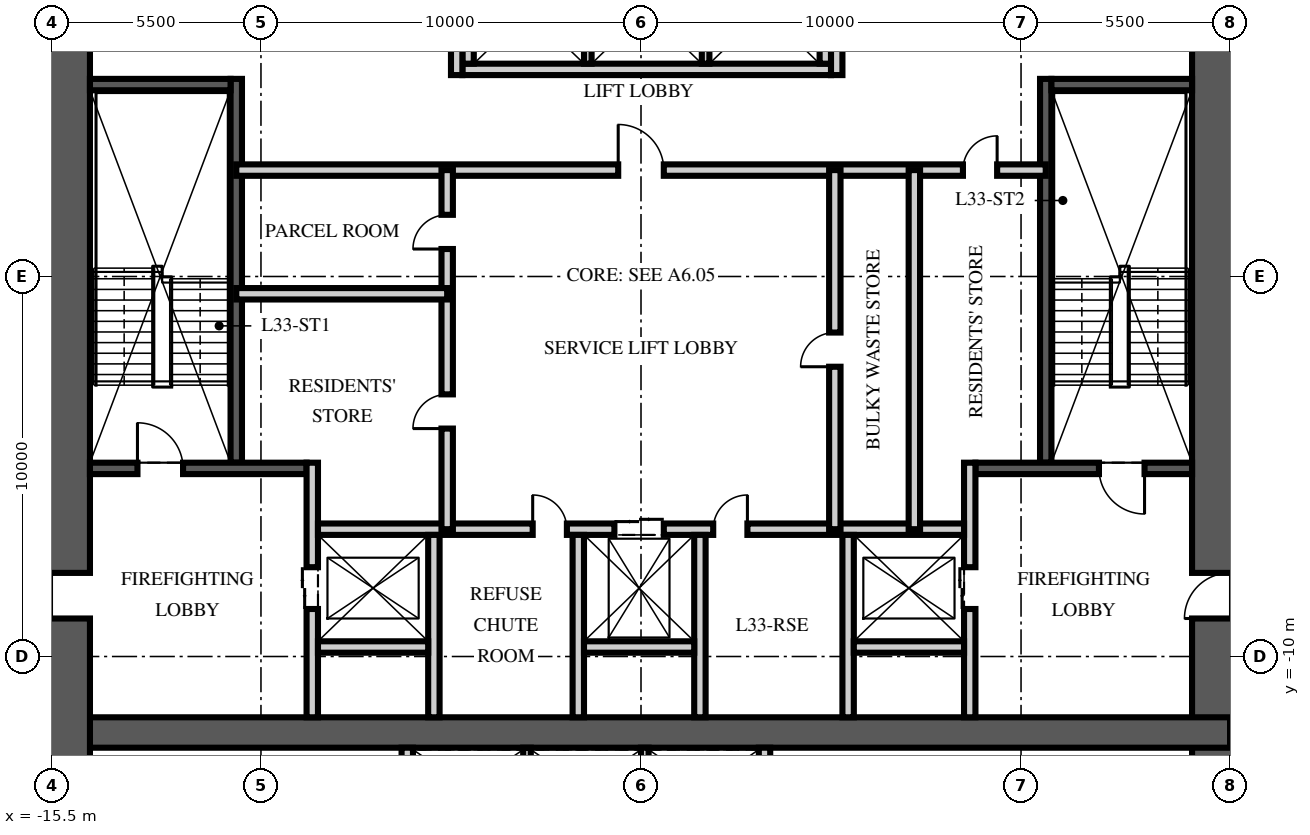
"""IFC4 building model, lengths in metres.
Left out: names, types, materials, properties, quantities, classifications, styles, units other than length and angle.
Written with IfcOpenShell. Run it as: python <this file> out.ifc"""

import sys

from ifc_helpers import new_model, si_unit, direction, frame, frame_2d, origin, place, context, subcontext, project, spatial, rectangle, extrude, element, fill, save


model = new_model("IFC4")
c1 = context("Model", 3, precision=1e-05, world=origin(), true_north=direction((0.0, 1.0)))
c2 = subcontext(c1, "Body", "Model", "MODEL_VIEW")
j1 = project(units=[si_unit("LENGTHUNIT", "METRE"), si_unit("PLANEANGLEUNIT", "RADIAN")], contexts=[c1])
p1 = place(None, origin())
s1 = spatial("IfcSite", under=j1, at=p1, CompositionType="ELEMENT")
p2 = place(p1, origin())
s2 = spatial("IfcBuilding", under=s1, at=p2, CompositionType="ELEMENT")
p3 = place(p2, frame((0.0, 0.0, 133.5)))
s3 = spatial("IfcBuildingStorey", under=s2, at=p3, CompositionType="ELEMENT", Elevation=133.5)
p4 = place(p3, frame((15.5, -15.5, -0.25), z_axis=(0.0, 0.0, 1.0), x_axis=(0.0, 1.0, 0.0)))
e1 = element("IfcWall", 1, at=p4, inside=s3, PredefinedType="SHEAR", context=c2, shape_type="SweptSolid", body=[
    extrude(rectangle(XDim=31.0, YDim=2.0, at=frame_2d((15.5, 0.0))), origin(), (0.0, 0.0, 1.0), 3.75),
])
p5 = place(p4, frame((6.5, 0.0, 0.25)))
e2 = element("IfcOpeningElement", 2, at=p5, cuts=e1, PredefinedType="OPENING", context=c2, shape_type="SweptSolid", body=[
    extrude(rectangle(XDim=1.2, YDim=2.1, at=frame_2d((0.6, 1.05))), frame((0.0, 1.01, 0.0), z_axis=(0.0, -1.0, 0.0), x_axis=(1.0, 0.0, 0.0)), (0.0, 0.0, 1.0), 2.02),
])
p6 = place(p4, frame((23.0, 0.0, 0.25)))
e3 = element("IfcOpeningElement", 3, at=p6, cuts=e1, PredefinedType="OPENING", context=c2, shape_type="SweptSolid", body=[
    extrude(rectangle(XDim=1.8, YDim=2.1, at=frame_2d((0.9, 1.05))), frame((0.0, 1.01, 0.0), z_axis=(0.0, -1.0, 0.0), x_axis=(1.0, 0.0, 0.0)), (0.0, 0.0, 1.0), 2.02),
])
p7 = place(p3, frame((-15.5, -12.0, -0.25), z_axis=(0.0, 0.0, 1.0), x_axis=(1.0, 0.0, 0.0)))
e4 = element("IfcWall", 4, at=p7, inside=s3, PredefinedType="SHEAR", context=c2, shape_type="SweptSolid", body=[
    extrude(rectangle(XDim=31.0, YDim=0.8, at=frame_2d((15.5, 0.0))), origin(), (0.0, 0.0, 1.0), 3.75),
])
p8 = place(p3, frame((-15.5, -15.5, -0.25), z_axis=(0.0, 0.0, 1.0), x_axis=(0.0, 1.0, 0.0)))
e5 = element("IfcWall", 5, at=p8, inside=s3, PredefinedType="SHEAR", context=c2, shape_type="SweptSolid", body=[
    extrude(rectangle(XDim=31.0, YDim=2.0, at=frame_2d((15.5, 0.0))), origin(), (0.0, 0.0, 1.0), 3.75),
])
p9 = place(p8, frame((6.5, 0.0, 0.25)))
e6 = element("IfcOpeningElement", 6, at=p9, cuts=e5, PredefinedType="OPENING", context=c2, shape_type="SweptSolid", body=[
    extrude(rectangle(XDim=1.2, YDim=2.1, at=frame_2d((0.6, 1.05))), frame((0.0, 1.01, 0.0), z_axis=(0.0, -1.0, 0.0), x_axis=(1.0, 0.0, 0.0)), (0.0, 0.0, 1.0), 2.02),
])
p10 = place(p8, frame((23.0, 0.0, 0.25)))
e7 = element("IfcOpeningElement", 7, at=p10, cuts=e5, PredefinedType="OPENING", context=c2, shape_type="SweptSolid", body=[
    extrude(rectangle(XDim=1.8, YDim=2.1, at=frame_2d((0.9, 1.05))), frame((0.0, 1.01, 0.0), z_axis=(0.0, -1.0, 0.0), x_axis=(1.0, 0.0, 0.0)), (0.0, 0.0, 1.0), 2.02),
])
p11 = place(p3, frame((-10.65, -4.9, 0.0), z_axis=(0.0, 0.0, 1.0), x_axis=(0.0, 1.0, 0.0)))
e8 = element("IfcWall", 8, at=p11, inside=s3, PredefinedType="SOLIDWALL", context=c2, shape_type="SweptSolid", body=[
    extrude(rectangle(XDim=10.1, YDim=0.3, at=frame_2d((5.05, 0.0))), origin(), (0.0, 0.0, 1.0), 3.5),
])
p12 = place(p3, frame((-14.5, -5.05, 0.0), z_axis=(0.0, 0.0, 1.0), x_axis=(1.0, 0.0, 0.0)))
e9 = element("IfcWall", 9, at=p12, inside=s3, PredefinedType="SOLIDWALL", context=c2, shape_type="SweptSolid", body=[
    extrude(rectangle(XDim=5.7, YDim=0.3, at=frame_2d((2.85, 0.0))), origin(), (0.0, 0.0, 1.0), 3.5),
])
p13 = place(p12, frame((1.25, 0.0, 0.0)))
e10 = element("IfcOpeningElement", 10, at=p13, cuts=e9, PredefinedType="OPENING", context=c2, shape_type="SweptSolid", body=[
    extrude(rectangle(XDim=1.2, YDim=2.1, at=frame_2d((0.6, 1.05))), frame((0.0, 0.16, 0.0), z_axis=(0.0, -1.0, 0.0), x_axis=(1.0, 0.0, 0.0)), (0.0, 0.0, 1.0), 0.32),
])
p14 = place(p3, frame((-14.5, 5.05, 0.0), z_axis=(0.0, 0.0, 1.0), x_axis=(1.0, 0.0, 0.0)))
e11 = element("IfcWall", 11, at=p14, inside=s3, PredefinedType="SOLIDWALL", context=c2, shape_type="SweptSolid", body=[
    extrude(rectangle(XDim=3.7, YDim=0.3, at=frame_2d((1.85, 0.0))), origin(), (0.0, 0.0, 1.0), 3.5),
])
p15 = place(p3, frame((-8.65, -11.6, 0.0), z_axis=(0.0, 0.0, 1.0), x_axis=(0.0, 1.0, 0.0)))
e12 = element("IfcWall", 12, at=p15, inside=s3, PredefinedType="PARTITIONING", context=c2, shape_type="SweptSolid", body=[
    extrude(rectangle(XDim=6.7, YDim=0.3, at=frame_2d((3.35, 0.0))), origin(), (0.0, 0.0, 1.0), 3.5),
])
p16 = place(p15, frame((2.85, 0.0, 0.0)))
e13 = element("IfcOpeningElement", 13, at=p16, cuts=e12, PredefinedType="OPENING", context=c2, shape_type="SweptSolid", body=[
    extrude(rectangle(XDim=1.1, YDim=2.1, at=frame_2d((0.55, 1.05))), frame((0.0, 0.16, 0.0), z_axis=(0.0, -1.0, 0.0), x_axis=(1.0, 0.0, 0.0)), (0.0, 0.0, 1.0), 0.32),
])
p17 = place(p3, frame((10.65, -4.9, 0.0), z_axis=(0.0, 0.0, 1.0), x_axis=(0.0, 1.0, 0.0)))
e14 = element("IfcWall", 14, at=p17, inside=s3, PredefinedType="SOLIDWALL", context=c2, shape_type="SweptSolid", body=[
    extrude(rectangle(XDim=10.1, YDim=0.3, at=frame_2d((5.05, 0.0))), origin(), (0.0, 0.0, 1.0), 3.5),
])
p18 = place(p3, frame((14.5, -5.05, 0.0), z_axis=(0.0, 0.0, 1.0), x_axis=(-1.0, 0.0, 0.0)))
e15 = element("IfcWall", 15, at=p18, inside=s3, PredefinedType="SOLIDWALL", context=c2, shape_type="SweptSolid", body=[
    extrude(rectangle(XDim=5.7, YDim=0.3, at=frame_2d((2.85, 0.0))), origin(), (0.0, 0.0, 1.0), 3.5),
])
p19 = place(p18, frame((1.25, 0.0, 0.0)))
e16 = element("IfcOpeningElement", 16, at=p19, cuts=e15, PredefinedType="OPENING", context=c2, shape_type="SweptSolid", body=[
    extrude(rectangle(XDim=1.2, YDim=2.1, at=frame_2d((0.6, 1.05))), frame((0.0, 0.16, 0.0), z_axis=(0.0, -1.0, 0.0), x_axis=(1.0, 0.0, 0.0)), (0.0, 0.0, 1.0), 0.32),
])
p20 = place(p3, frame((14.5, 5.05, 0.0), z_axis=(0.0, 0.0, 1.0), x_axis=(-1.0, 0.0, 0.0)))
e17 = element("IfcWall", 17, at=p20, inside=s3, PredefinedType="SOLIDWALL", context=c2, shape_type="SweptSolid", body=[
    extrude(rectangle(XDim=3.7, YDim=0.3, at=frame_2d((1.85, 0.0))), origin(), (0.0, 0.0, 1.0), 3.5),
])
p21 = place(p3, frame((8.65, -11.6, 0.0), z_axis=(0.0, 0.0, 1.0), x_axis=(0.0, 1.0, 0.0)))
e18 = element("IfcWall", 18, at=p21, inside=s3, PredefinedType="PARTITIONING", context=c2, shape_type="SweptSolid", body=[
    extrude(rectangle(XDim=6.7, YDim=0.3, at=frame_2d((3.35, 0.0))), origin(), (0.0, 0.0, 1.0), 3.5),
])
p22 = place(p21, frame((2.85, 0.0, 0.0)))
e19 = element("IfcOpeningElement", 19, at=p22, cuts=e18, PredefinedType="OPENING", context=c2, shape_type="SweptSolid", body=[
    extrude(rectangle(XDim=1.1, YDim=2.1, at=frame_2d((0.55, 1.05))), frame((0.0, 0.16, 0.0), z_axis=(0.0, -1.0, 0.0), x_axis=(1.0, 0.0, 0.0)), (0.0, 0.0, 1.0), 0.32),
])
p23 = place(p3, frame((-8.5, -6.65, 0.0), z_axis=(0.0, 0.0, 1.0), x_axis=(1.0, 0.0, 0.0)))
e20 = element("IfcWall", 20, at=p23, inside=s3, PredefinedType="PARTITIONING", context=c2, shape_type="SweptSolid", body=[
    extrude(rectangle(XDim=17.0, YDim=0.3, at=frame_2d((8.5, 0.0))), origin(), (0.0, 0.0, 1.0), 3.5),
])
p24 = place(p23, frame((7.8, 0.0, 0.0)))
e21 = element("IfcOpeningElement", 21, at=p24, cuts=e20, PredefinedType="OPENING", context=c2, shape_type="SweptSolid", body=[
    extrude(rectangle(XDim=1.3, YDim=2.4, at=frame_2d((0.65, 1.2))), frame((0.0, 0.16, 0.0), z_axis=(0.0, -1.0, 0.0), x_axis=(1.0, 0.0, 0.0)), (0.0, 0.0, 1.0), 0.32),
])
p25 = place(p23, frame((5.65, 0.0, 0.0)))
e22 = element("IfcOpeningElement", 22, at=p25, cuts=e20, PredefinedType="OPENING", context=c2, shape_type="SweptSolid", body=[
    extrude(rectangle(XDim=0.9, YDim=2.1, at=frame_2d((0.45, 1.05))), frame((0.0, 0.16, 0.0), z_axis=(0.0, -1.0, 0.0), x_axis=(1.0, 0.0, 0.0)), (0.0, 0.0, 1.0), 0.32),
])
p26 = place(p23, frame((10.4, 0.0, 0.0)))
e23 = element("IfcOpeningElement", 23, at=p26, cuts=e20, PredefinedType="OPENING", context=c2, shape_type="SweptSolid", body=[
    extrude(rectangle(XDim=0.9, YDim=2.1, at=frame_2d((0.45, 1.05))), frame((0.0, 0.16, 0.0), z_axis=(0.0, -1.0, 0.0), x_axis=(1.0, 0.0, 0.0)), (0.0, 0.0, 1.0), 0.32),
])
for number, where, z_axis, x_axis in (
    (24, (-5.45, -11.6, 0.0), (0.0, 0.0, 1.0), (0.0, 1.0, 0.0)),
    (25, (-1.65, -11.6, 0.0), (0.0, 0.0, 1.0), (0.0, 1.0, 0.0)),
    (26, (1.55, -11.6, 0.0), (0.0, 0.0, 1.0), (0.0, 1.0, 0.0)),
    (27, (5.45, -11.6, 0.0), (0.0, 0.0, 1.0), (0.0, 1.0, 0.0)),
):
    element("IfcWall", number, at=place(p3, frame(where, z_axis=z_axis, x_axis=x_axis)), inside=s3, PredefinedType="PARTITIONING", context=c2, shape_type="SweptSolid", body=[
        extrude(rectangle(XDim=4.8, YDim=0.3, at=frame_2d((2.4, 0.0))), origin(), (0.0, 0.0, 1.0), 3.5),
    ])
for number, where, z_axis, x_axis in (
    (28, (-8.5, -9.75, 0.0), (0.0, 0.0, 1.0), (1.0, 0.0, 0.0)),
    (29, (-1.5, -9.75, 0.0), (0.0, 0.0, 1.0), (1.0, 0.0, 0.0)),
    (30, (5.6, -9.75, 0.0), (0.0, 0.0, 1.0), (1.0, 0.0, 0.0)),
):
    element("IfcWall", number, at=place(p3, frame(where, z_axis=z_axis, x_axis=x_axis)), inside=s3, PredefinedType="PARTITIONING", context=c2, shape_type="SweptSolid", body=[
        extrude(rectangle(XDim=2.9, YDim=0.3, at=frame_2d((1.45, 0.0))), origin(), (0.0, 0.0, 1.0), 3.5),
    ])
p27 = place(p3, frame((-4.7, 5.45, 0.0), z_axis=(0.0, 0.0, 1.0), x_axis=(1.0, 0.0, 0.0)))
e31 = element("IfcWall", 31, at=p27, inside=s3, PredefinedType="PARTITIONING", context=c2, shape_type="SweptSolid", body=[
    extrude(rectangle(XDim=9.7, YDim=0.3, at=frame_2d((4.85, 0.0))), origin(), (0.0, 0.0, 1.0), 3.5),
])
for number, where, z_axis, x_axis in (
    (32, (-4.55, 5.6, 0.0), (0.0, 0.0, 1.0), (0.0, 1.0, 0.0)),
    (33, (4.85, 5.6, 0.0), (0.0, 0.0, 1.0), (0.0, 1.0, 0.0)),
):
    element("IfcWall", number, at=place(p3, frame(where, z_axis=z_axis, x_axis=x_axis)), inside=s3, PredefinedType="PARTITIONING", context=c2, shape_type="SweptSolid", body=[
        extrude(rectangle(XDim=2.8, YDim=0.3, at=frame_2d((1.4, 0.0))), origin(), (0.0, 0.0, 1.0), 3.5),
    ])
for number, where, z_axis, x_axis in (
    (34, (-1.4, 5.6, 0.0), (0.0, 0.0, 1.0), (0.0, 1.0, 0.0)),
    (35, (1.7, 5.6, 0.0), (0.0, 0.0, 1.0), (0.0, 1.0, 0.0)),
):
    element("IfcWall", number, at=place(p3, frame(where, z_axis=z_axis, x_axis=x_axis)), inside=s3, PredefinedType="PARTITIONING", context=c2, shape_type="SweptSolid", body=[
        extrude(rectangle(XDim=2.8, YDim=0.2, at=frame_2d((1.4, 0.0))), origin(), (0.0, 0.0, 1.0), 3.5),
    ])
for number, where, z_axis, x_axis in (
    (36, (-6.15, -14.5, 0.0), (0.0, 0.0, 1.0), (0.0, 1.0, 0.0)),
    (37, (3.25, -14.5, 0.0), (0.0, 0.0, 1.0), (0.0, 1.0, 0.0)),
):
    element("IfcWall", number, at=place(p3, frame(where, z_axis=z_axis, x_axis=x_axis)), inside=s3, PredefinedType="PARTITIONING", context=c2, shape_type="SweptSolid", body=[
        extrude(rectangle(XDim=2.1, YDim=0.3, at=frame_2d((1.05, 0.0))), origin(), (0.0, 0.0, 1.0), 3.5),
    ])
for number, where, z_axis, x_axis in (
    (38, (-3.0, -14.5, 0.0), (0.0, 0.0, 1.0), (0.0, 1.0, 0.0)),
    (39, (0.1, -14.5, 0.0), (0.0, 0.0, 1.0), (0.0, 1.0, 0.0)),
):
    element("IfcWall", number, at=place(p3, frame(where, z_axis=z_axis, x_axis=x_axis)), inside=s3, PredefinedType="PARTITIONING", context=c2, shape_type="SweptSolid", body=[
        extrude(rectangle(XDim=2.1, YDim=0.2, at=frame_2d((1.05, 0.0))), origin(), (0.0, 0.0, 1.0), 3.5),
    ])
p28 = place(p3, frame((-10.65, 2.8, 0.0), z_axis=(0.0, 0.0, 1.0), x_axis=(1.0, 0.0, 0.0)))
e40 = element("IfcWall", 40, at=p28, inside=s3, PredefinedType="PARTITIONING", context=c2, shape_type="SweptSolid", body=[
    extrude(rectangle(XDim=21.3, YDim=0.3, at=frame_2d((10.65, 0.0))), origin(), (0.0, 0.0, 1.0), 3.5),
])
p29 = place(p28, frame((10.05, 0.0, 0.0)))
e41 = element("IfcOpeningElement", 41, at=p29, cuts=e40, PredefinedType="OPENING", context=c2, shape_type="SweptSolid", body=[
    extrude(rectangle(XDim=1.2, YDim=2.1, at=frame_2d((0.6, 1.05))), frame((0.0, 0.16, 0.0), z_axis=(0.0, -1.0, 0.0), x_axis=(1.0, 0.0, 0.0)), (0.0, 0.0, 1.0), 0.32),
])
p30 = place(p28, frame((19.121, 0.0, 0.0)))
e42 = element("IfcOpeningElement", 42, at=p30, cuts=e40, PredefinedType="OPENING", context=c2, shape_type="SweptSolid", body=[
    extrude(rectangle(XDim=0.9, YDim=2.1, at=frame_2d((0.45, 1.05))), frame((0.0, 0.16, 0.0), z_axis=(0.0, -1.0, 0.0), x_axis=(1.0, 0.0, 0.0)), (0.0, 0.0, 1.0), 0.32),
])
p31 = place(p3, frame((-5.1, -6.65, 0.0), z_axis=(0.0, 0.0, 1.0), x_axis=(0.0, 1.0, 0.0)))
e43 = element("IfcWall", 43, at=p31, inside=s3, PredefinedType="PARTITIONING", context=c2, shape_type="SweptSolid", body=[
    extrude(rectangle(XDim=9.45, YDim=0.3, at=frame_2d((4.725, 0.0))), origin(), (0.0, 0.0, 1.0), 3.5),
])
p32 = place(p31, frame((2.648, 0.0, 0.0)))
e44 = element("IfcOpeningElement", 44, at=p32, cuts=e43, PredefinedType="OPENING", context=c2, shape_type="SweptSolid", body=[
    extrude(rectangle(XDim=0.9, YDim=2.1, at=frame_2d((0.45, 1.05))), frame((0.0, 0.16, 0.0), z_axis=(0.0, -1.0, 0.0), x_axis=(1.0, 0.0, 0.0)), (0.0, 0.0, 1.0), 0.32),
])
p33 = place(p31, frame((7.373, 0.0, 0.0)))
e45 = element("IfcOpeningElement", 45, at=p33, cuts=e43, PredefinedType="OPENING", context=c2, shape_type="SweptSolid", body=[
    extrude(rectangle(XDim=0.9, YDim=2.1, at=frame_2d((0.45, 1.05))), frame((0.0, 0.16, 0.0), z_axis=(0.0, -1.0, 0.0), x_axis=(1.0, 0.0, 0.0)), (0.0, 0.0, 1.0), 0.32),
])
p34 = place(p3, frame((5.1, -6.65, 0.0), z_axis=(0.0, 0.0, 1.0), x_axis=(0.0, 1.0, 0.0)))
e46 = element("IfcWall", 46, at=p34, inside=s3, PredefinedType="PARTITIONING", context=c2, shape_type="SweptSolid", body=[
    extrude(rectangle(XDim=9.45, YDim=0.3, at=frame_2d((4.725, 0.0))), origin(), (0.0, 0.0, 1.0), 3.5),
])
p35 = place(p34, frame((4.275, 0.0, 0.0)))
e47 = element("IfcOpeningElement", 47, at=p35, cuts=e46, PredefinedType="OPENING", context=c2, shape_type="SweptSolid", body=[
    extrude(rectangle(XDim=0.9, YDim=2.1, at=frame_2d((0.45, 1.05))), frame((0.0, 0.16, 0.0), z_axis=(0.0, -1.0, 0.0), x_axis=(1.0, 0.0, 0.0)), (0.0, 0.0, 1.0), 0.32),
])
p36 = place(p3, frame((-10.65, -0.455, 0.0), z_axis=(0.0, 0.0, 1.0), x_axis=(1.0, 0.0, 0.0)))
e48 = element("IfcWall", 48, at=p36, inside=s3, PredefinedType="PARTITIONING", context=c2, shape_type="SweptSolid", body=[
    extrude(rectangle(XDim=5.55, YDim=0.3, at=frame_2d((2.775, 0.0))), origin(), (0.0, 0.0, 1.0), 3.5),
])
p37 = place(p3, frame((7.193, -6.65, 0.0), z_axis=(0.0, 0.0, 1.0), x_axis=(0.0, 1.0, 0.0)))
e49 = element("IfcWall", 49, at=p37, inside=s3, PredefinedType="PARTITIONING", context=c2, shape_type="SweptSolid", body=[
    extrude(rectangle(XDim=9.45, YDim=0.3, at=frame_2d((4.725, 0.0))), origin(), (0.0, 0.0, 1.0), 3.5),
])
p38 = place(p3, frame((-4.85, 5.3, 0.0), z_axis=(0.0, 0.0, 1.0), x_axis=(0.0, 1.0, 0.0)))
e50 = element("IfcWall", 50, at=p38, inside=s3, PredefinedType="PARTITIONING", context=c2, shape_type="SweptSolid", body=[
    extrude(rectangle(XDim=6.3, YDim=0.3, at=frame_2d((3.15, 0.0))), origin(), (0.0, 0.0, 1.0), 3.5),
])
p39 = place(p3, frame((5.15, 5.3, 0.0), z_axis=(0.0, 0.0, 1.0), x_axis=(0.0, 1.0, 0.0)))
e51 = element("IfcWall", 51, at=p39, inside=s3, PredefinedType="PARTITIONING", context=c2, shape_type="SweptSolid", body=[
    extrude(rectangle(XDim=6.3, YDim=0.3, at=frame_2d((3.15, 0.0))), origin(), (0.0, 0.0, 1.0), 3.5),
])
p40 = place(p39, frame((4.35, 0.0, 0.0)))
e52 = element("IfcOpeningElement", 52, at=p40, cuts=e51, PredefinedType="OPENING", context=c2, shape_type="SweptSolid", body=[
    extrude(rectangle(XDim=0.9, YDim=2.1, at=frame_2d((0.45, 1.05))), frame((0.0, 0.16, 0.0), z_axis=(0.0, -1.0, 0.0), x_axis=(1.0, 0.0, 0.0)), (0.0, 0.0, 1.0), 0.32),
])
p41 = place(p13, origin())
e53 = element("IfcDoor", 53, at=p41, inside=s3, OperationType="SINGLE_SWING_LEFT", PredefinedType="DOOR", context=c2, shape_type="SweptSolid", body=[
    extrude(rectangle(XDim=1.2, YDim=2.1, at=frame_2d((0.6, 1.05))), frame((0.0, 0.025, 0.0), z_axis=(0.0, -1.0, 0.0), x_axis=(1.0, 0.0, 0.0)), (0.0, 0.0, 1.0), 0.05),
])
fill(e10, e53)
p42 = place(p9, origin())
e54 = element("IfcDoor", 54, at=p42, inside=s3, OperationType="SINGLE_SWING_LEFT", PredefinedType="DOOR", context=c2, shape_type="SweptSolid", body=[
    extrude(rectangle(XDim=1.2, YDim=2.1, at=frame_2d((0.6, 1.05))), frame((0.0, 0.025, 0.0), z_axis=(0.0, -1.0, 0.0), x_axis=(1.0, 0.0, 0.0)), (0.0, 0.0, 1.0), 0.05),
])
fill(e6, e54)
p43 = place(p19, origin())
e55 = element("IfcDoor", 55, at=p43, inside=s3, OperationType="SINGLE_SWING_LEFT", PredefinedType="DOOR", context=c2, shape_type="SweptSolid", body=[
    extrude(rectangle(XDim=1.2, YDim=2.1, at=frame_2d((0.6, 1.05))), frame((0.0, 0.025, 0.0), z_axis=(0.0, -1.0, 0.0), x_axis=(1.0, 0.0, 0.0)), (0.0, 0.0, 1.0), 0.05),
])
fill(e16, e55)
p44 = place(p5, origin())
e56 = element("IfcDoor", 56, at=p44, inside=s3, OperationType="SINGLE_SWING_LEFT", PredefinedType="DOOR", context=c2, shape_type="SweptSolid", body=[
    extrude(rectangle(XDim=1.2, YDim=2.1, at=frame_2d((0.6, 1.05))), frame((0.0, 0.025, 0.0), z_axis=(0.0, -1.0, 0.0), x_axis=(1.0, 0.0, 0.0)), (0.0, 0.0, 1.0), 0.05),
])
fill(e2, e56)
p45 = place(p16, origin())
e57 = element("IfcDoor", 57, at=p45, inside=s3, OperationType="DOUBLE_DOOR_SLIDING", PredefinedType="DOOR", context=c2, shape_type="SweptSolid", body=[
    extrude(rectangle(XDim=1.1, YDim=2.1, at=frame_2d((0.55, 1.05))), frame((0.0, 0.025, 0.0), z_axis=(0.0, -1.0, 0.0), x_axis=(1.0, 0.0, 0.0)), (0.0, 0.0, 1.0), 0.05),
])
fill(e13, e57)
p46 = place(p22, origin())
e58 = element("IfcDoor", 58, at=p46, inside=s3, OperationType="DOUBLE_DOOR_SLIDING", PredefinedType="DOOR", context=c2, shape_type="SweptSolid", body=[
    extrude(rectangle(XDim=1.1, YDim=2.1, at=frame_2d((0.55, 1.05))), frame((0.0, 0.025, 0.0), z_axis=(0.0, -1.0, 0.0), x_axis=(1.0, 0.0, 0.0)), (0.0, 0.0, 1.0), 0.05),
])
fill(e19, e58)
p47 = place(p24, origin())
e59 = element("IfcDoor", 59, at=p47, inside=s3, OperationType="DOUBLE_DOOR_SLIDING", PredefinedType="DOOR", context=c2, shape_type="SweptSolid", body=[
    extrude(rectangle(XDim=1.3, YDim=2.4, at=frame_2d((0.65, 1.2))), frame((0.0, 0.025, 0.0), z_axis=(0.0, -1.0, 0.0), x_axis=(1.0, 0.0, 0.0)), (0.0, 0.0, 1.0), 0.05),
])
fill(e21, e59)
p48 = place(p29, origin())
e60 = element("IfcDoor", 60, at=p48, inside=s3, OperationType="SINGLE_SWING_LEFT", PredefinedType="DOOR", context=c2, shape_type="SweptSolid", body=[
    extrude(rectangle(XDim=1.2, YDim=2.1, at=frame_2d((0.6, 1.05))), frame((0.0, 0.025, 0.0), z_axis=(0.0, -1.0, 0.0), x_axis=(1.0, 0.0, 0.0)), (0.0, 0.0, 1.0), 0.05),
])
fill(e41, e60)
p49 = place(p25, origin())
e61 = element("IfcDoor", 61, at=p49, inside=s3, OperationType="SINGLE_SWING_LEFT", PredefinedType="DOOR", context=c2, shape_type="SweptSolid", body=[
    extrude(rectangle(XDim=0.9, YDim=2.1, at=frame_2d((0.45, 1.05))), frame((0.0, 0.025, 0.0), z_axis=(0.0, -1.0, 0.0), x_axis=(1.0, 0.0, 0.0)), (0.0, 0.0, 1.0), 0.05),
])
fill(e22, e61)
p50 = place(p26, origin())
e62 = element("IfcDoor", 62, at=p50, inside=s3, OperationType="SINGLE_SWING_RIGHT", PredefinedType="DOOR", context=c2, shape_type="SweptSolid", body=[
    extrude(rectangle(XDim=0.9, YDim=2.1, at=frame_2d((0.45, 1.05))), frame((0.0, 0.025, 0.0), z_axis=(0.0, -1.0, 0.0), x_axis=(1.0, 0.0, 0.0)), (0.0, 0.0, 1.0), 0.05),
])
fill(e23, e62)
p51 = place(p32, origin())
e63 = element("IfcDoor", 63, at=p51, inside=s3, OperationType="SINGLE_SWING_LEFT", PredefinedType="DOOR", context=c2, shape_type="SweptSolid", body=[
    extrude(rectangle(XDim=0.9, YDim=2.1, at=frame_2d((0.45, 1.05))), frame((0.0, 0.025, 0.0), z_axis=(0.0, -1.0, 0.0), x_axis=(1.0, 0.0, 0.0)), (0.0, 0.0, 1.0), 0.05),
])
fill(e44, e63)
p52 = place(p33, origin())
e64 = element("IfcDoor", 64, at=p52, inside=s3, OperationType="SINGLE_SWING_LEFT", PredefinedType="DOOR", context=c2, shape_type="SweptSolid", body=[
    extrude(rectangle(XDim=0.9, YDim=2.1, at=frame_2d((0.45, 1.05))), frame((0.0, 0.025, 0.0), z_axis=(0.0, -1.0, 0.0), x_axis=(1.0, 0.0, 0.0)), (0.0, 0.0, 1.0), 0.05),
])
fill(e45, e64)
p53 = place(p35, origin())
e65 = element("IfcDoor", 65, at=p53, inside=s3, OperationType="SINGLE_SWING_LEFT", PredefinedType="DOOR", context=c2, shape_type="SweptSolid", body=[
    extrude(rectangle(XDim=0.9, YDim=2.1, at=frame_2d((0.45, 1.05))), frame((0.0, 0.025, 0.0), z_axis=(0.0, -1.0, 0.0), x_axis=(1.0, 0.0, 0.0)), (0.0, 0.0, 1.0), 0.05),
])
fill(e47, e65)
p54 = place(p30, origin())
e66 = element("IfcDoor", 66, at=p54, inside=s3, OperationType="SINGLE_SWING_RIGHT", PredefinedType="DOOR", context=c2, shape_type="SweptSolid", body=[
    extrude(rectangle(XDim=0.9, YDim=2.1, at=frame_2d((0.45, 1.05))), frame((0.0, 0.025, 0.0), z_axis=(0.0, -1.0, 0.0), x_axis=(1.0, 0.0, 0.0)), (0.0, 0.0, 1.0), 0.05),
])
fill(e42, e66)
save(model, sys.argv[1])
